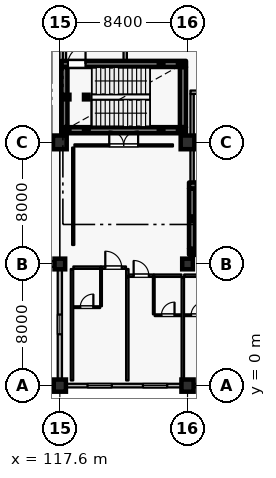
"""IFC4 building model, lengths in metres.
Left out: names, types, materials, properties, quantities, classifications, styles, units other than length and angle.
Written with IfcOpenShell. Run it as: python <this file> out.ifc"""

import sys

from ifc_helpers import new_model, si_unit, direction, frame, frame_2d, origin, origin_2d, place, context, subcontext, project, spatial, rectangle, hollow_rectangle, extrude, element, fill, save


model = new_model("IFC4")
c1 = context("Model", 3, precision=1e-05, world=origin(), true_north=direction((0.0, 1.0)))
c2 = subcontext(c1, "Body", "Model", "MODEL_VIEW")
j1 = project(units=[si_unit("LENGTHUNIT", "METRE"), si_unit("PLANEANGLEUNIT", "RADIAN")], contexts=[c1])
p1 = place(None, origin())
s1 = spatial("IfcSite", under=j1, at=p1, CompositionType="ELEMENT")
p2 = place(p1, origin())
s2 = spatial("IfcBuilding", under=s1, at=p2, CompositionType="ELEMENT")
p3 = place(p2, frame((0.0, 0.0, 11.4)))
s3 = spatial("IfcBuildingStorey", under=s2, at=p3, CompositionType="ELEMENT", Elevation=11.4)
p4 = place(p3, frame((117.6, 0.0, 0.0), z_axis=(0.0, 0.0, 1.0), x_axis=(1.0, 0.0, 0.0)))
e1 = element("IfcColumn", 1, at=p4, inside=s3, PredefinedType="COLUMN", context=c2, shape_type="SweptSolid", body=[
    extrude(rectangle(XDim=0.8, YDim=0.8, at=origin_2d()), origin(), (0.0, 0.0, 1.0), 4.8),
])
p5 = place(p3, frame((117.6, 16.0, 0.0), z_axis=(0.0, 0.0, 1.0), x_axis=(1.0, 0.0, 0.0)))
e2 = element("IfcColumn", 2, at=p5, inside=s3, PredefinedType="COLUMN", context=c2, shape_type="SweptSolid", body=[
    extrude(rectangle(XDim=0.9, YDim=0.9, at=origin_2d()), origin(), (0.0, 0.0, 1.0), 4.8),
])
p6 = place(p3, frame((126.0, 0.0, 0.0), z_axis=(0.0, 0.0, 1.0), x_axis=(1.0, 0.0, 0.0)))
e3 = element("IfcColumn", 3, at=p6, inside=s3, PredefinedType="COLUMN", context=c2, shape_type="SweptSolid", body=[
    extrude(rectangle(XDim=0.8, YDim=0.8, at=origin_2d()), origin(), (0.0, 0.0, 1.0), 4.8),
])
p7 = place(p3, frame((126.0, 16.0, 0.0), z_axis=(0.0, 0.0, 1.0), x_axis=(1.0, 0.0, 0.0)))
e4 = element("IfcColumn", 4, at=p7, inside=s3, PredefinedType="COLUMN", context=c2, shape_type="SweptSolid", body=[
    extrude(rectangle(XDim=0.9, YDim=0.9, at=origin_2d()), origin(), (0.0, 0.0, 1.0), 4.8),
])
for number, where, z_axis, x_axis in (
    (5, (117.6, 8.0, 0.0), (0.0, 0.0, 1.0), (1.0, 0.0, 0.0)),
    (6, (126.0, 8.0, 0.0), (0.0, 0.0, 1.0), (1.0, 0.0, 0.0)),
):
    element("IfcColumn", number, at=place(p3, frame(where, z_axis=z_axis, x_axis=x_axis)), inside=s3, PredefinedType="COLUMN", context=c2, shape_type="SweptSolid", body=[
        extrude(rectangle(XDim=0.7, YDim=0.7, at=origin_2d()), origin(), (0.0, 0.0, 1.0), 4.8),
    ])
p8 = place(p3, frame((117.25, 8.0, 0.0), z_axis=(0.0, 0.0, 1.0), x_axis=(-1.0, 0.0, 0.0)))
e7 = element("IfcWall", 7, at=p8, inside=s3, PredefinedType="SOLIDWALL", context=c2, shape_type="SweptSolid", body=[
    extrude(rectangle(XDim=7.7, YDim=0.38, at=frame_2d((3.85, 0.0))), origin(), (0.0, 0.0, 1.0), 3.85),
])
p9 = place(p8, frame((2.7, 0.0, 0.95)))
e8 = element("IfcOpeningElement", 8, at=p9, cuts=e7, PredefinedType="OPENING", context=c2, shape_type="SweptSolid", body=[
    extrude(rectangle(XDim=2.3, YDim=1.5, at=frame_2d((1.15, 0.75))), frame((0.0, 0.2, 0.0), z_axis=(0.0, -1.0, 0.0), x_axis=(1.0, 0.0, 0.0)), (0.0, 0.0, 1.0), 0.4),
])
p10 = place(p3, frame((125.6, 0.0, 0.0), z_axis=(0.0, 0.0, 1.0), x_axis=(-1.0, 0.0, 0.0)))
e9 = element("IfcWall", 9, at=p10, inside=s3, PredefinedType="SOLIDWALL", context=c2, shape_type="SweptSolid", body=[
    extrude(rectangle(XDim=7.6, YDim=0.24, at=frame_2d((3.8, 0.0))), origin(), (0.0, 0.0, 1.0), 4.13),
])
p11 = place(p10, frame((0.935, 0.0, 0.8)))
e10 = element("IfcOpeningElement", 10, at=p11, cuts=e9, PredefinedType="OPENING", context=c2, shape_type="SweptSolid", body=[
    extrude(rectangle(XDim=1.6, YDim=1.6, at=frame_2d((0.8, 0.8))), frame((0.0, 0.13, 0.0), z_axis=(0.0, -1.0, 0.0), x_axis=(1.0, 0.0, 0.0)), (0.0, 0.0, 1.0), 0.26),
])
p12 = place(p10, frame((4.58, 0.0, 0.8)))
e11 = element("IfcOpeningElement", 11, at=p12, cuts=e9, PredefinedType="OPENING", context=c2, shape_type="SweptSolid", body=[
    extrude(rectangle(XDim=1.6, YDim=1.6, at=frame_2d((0.8, 0.8))), frame((0.0, 0.13, 0.0), z_axis=(0.0, -1.0, 0.0), x_axis=(1.0, 0.0, 0.0)), (0.0, 0.0, 1.0), 0.26),
])
p13 = place(p3, frame((134.0, 0.0, 0.0), z_axis=(0.0, 0.0, 1.0), x_axis=(-1.0, 0.0, 0.0)))
e12 = element("IfcWall", 12, at=p13, inside=s3, PredefinedType="SOLIDWALL", context=c2, shape_type="SweptSolid", body=[
    extrude(rectangle(XDim=7.6, YDim=0.24, at=frame_2d((3.8, 0.0))), origin(), (0.0, 0.0, 1.0), 4.13),
])
p14 = place(p13, frame((2.045, 0.0, 0.8)))
e13 = element("IfcOpeningElement", 13, at=p14, cuts=e12, PredefinedType="OPENING", context=c2, shape_type="SweptSolid", body=[
    extrude(rectangle(XDim=1.6, YDim=1.6, at=frame_2d((0.8, 0.8))), frame((0.0, 0.13, 0.0), z_axis=(0.0, -1.0, 0.0), x_axis=(1.0, 0.0, 0.0)), (0.0, 0.0, 1.0), 0.26),
])
p15 = place(p13, frame((5.385, 0.0, 0.8)))
e14 = element("IfcOpeningElement", 14, at=p15, cuts=e12, PredefinedType="OPENING", context=c2, shape_type="SweptSolid", body=[
    extrude(rectangle(XDim=1.6, YDim=1.6, at=frame_2d((0.8, 0.8))), frame((0.0, 0.13, 0.0), z_axis=(0.0, -1.0, 0.0), x_axis=(1.0, 0.0, 0.0)), (0.0, 0.0, 1.0), 0.26),
])
p16 = place(p3, frame((117.6, 0.4, 0.0), z_axis=(0.0, 0.0, 1.0), x_axis=(0.0, 1.0, 0.0)))
e15 = element("IfcWall", 15, at=p16, inside=s3, PredefinedType="SOLIDWALL", context=c2, shape_type="SweptSolid", body=[
    extrude(rectangle(XDim=7.25, YDim=0.28, at=frame_2d((3.625, 0.0))), origin(), (0.0, 0.0, 1.0), 3.9),
])
p17 = place(p16, frame((2.975, 0.0, 0.75)))
e16 = element("IfcOpeningElement", 16, at=p17, cuts=e15, PredefinedType="OPENING", context=c2, shape_type="SweptSolid", body=[
    extrude(rectangle(XDim=1.3, YDim=1.65, at=frame_2d((0.65, 0.825))), frame((0.0, 0.15, 0.0), z_axis=(0.0, -1.0, 0.0), x_axis=(1.0, 0.0, 0.0)), (0.0, 0.0, 1.0), 0.3),
])
p18 = place(p3, frame((126.1, 8.8, 0.0), z_axis=(0.0, 0.0, 1.0), x_axis=(1.0, 0.0, 0.0)))
e17 = element("IfcWall", 17, at=p18, inside=s3, PredefinedType="SHEAR", context=c2, shape_type="SweptSolid", body=[
    extrude(rectangle(XDim=8.2, YDim=0.4, at=frame_2d((4.1, 0.0))), origin(), (0.0, 0.0, 1.0), 4.535),
])
p19 = place(p3, frame((126.1, 13.16, 0.0), z_axis=(0.0, 0.0, 1.0), x_axis=(1.0, 0.0, 0.0)))
e18 = element("IfcWall", 18, at=p19, inside=s3, PredefinedType="SHEAR", context=c2, shape_type="SweptSolid", body=[
    extrude(rectangle(XDim=8.2, YDim=0.4, at=frame_2d((4.1, 0.0))), origin(), (0.0, 0.0, 1.0), 4.535),
])
p20 = place(p19, frame((0.43, 0.0, 0.0)))
e19 = element("IfcOpeningElement", 19, at=p20, cuts=e18, PredefinedType="OPENING", context=c2, shape_type="SweptSolid", body=[
    extrude(rectangle(XDim=1.16, YDim=2.2, at=frame_2d((0.58, 1.1))), frame((0.0, 0.21, 0.0), z_axis=(0.0, -1.0, 0.0), x_axis=(1.0, 0.0, 0.0)), (0.0, 0.0, 1.0), 0.42),
])
p21 = place(p3, frame((126.3, 9.005, 0.0), z_axis=(0.0, 0.0, 1.0), x_axis=(0.0, 1.0, 0.0)))
e20 = element("IfcWall", 20, at=p21, inside=s3, PredefinedType="SHEAR", context=c2, shape_type="SweptSolid", body=[
    extrude(rectangle(XDim=3.95, YDim=0.4, at=frame_2d((1.975, 0.0))), origin(), (0.0, 0.0, 1.0), 4.535),
])
p22 = place(p3, frame((126.3, 13.365, 0.0), z_axis=(0.0, 0.0, 1.0), x_axis=(0.0, 1.0, 0.0)))
e21 = element("IfcWall", 21, at=p22, inside=s3, PredefinedType="PARTITIONING", context=c2, shape_type="SweptSolid", body=[
    extrude(rectangle(XDim=5.82, YDim=0.22, at=frame_2d((2.91, 0.0))), origin(), (0.0, 0.0, 1.0), 4.535),
])
p23 = place(p3, frame((126.19, 19.3, 0.0), z_axis=(0.0, 0.0, 1.0), x_axis=(1.0, 0.0, 0.0)))
e22 = element("IfcWall", 22, at=p23, inside=s3, PredefinedType="PARTITIONING", context=c2, shape_type="SweptSolid", body=[
    extrude(rectangle(XDim=3.82, YDim=0.22, at=frame_2d((1.91, 0.0))), origin(), (0.0, 0.0, 1.0), 4.535),
])
p24 = place(p23, frame((1.35, 0.0, 0.0)))
e23 = element("IfcOpeningElement", 23, at=p24, cuts=e22, PredefinedType="OPENING", context=c2, shape_type="SweptSolid", body=[
    extrude(rectangle(XDim=1.12, YDim=2.2, at=frame_2d((0.56, 1.1))), frame((0.0, 0.12, 0.0), z_axis=(0.0, -1.0, 0.0), x_axis=(1.0, 0.0, 0.0)), (0.0, 0.0, 1.0), 0.24),
])
for number, where, z_axis, x_axis in (
    (24, (126.48, 8.8, 0.0), (0.0, 0.0, 1.0), (1.0, 0.0, 0.0)),
    (25, (126.48, 10.98, 0.0), (0.0, 0.0, 1.0), (1.0, 0.0, 0.0)),
):
    element("IfcColumn", number, at=place(p3, frame(where, z_axis=z_axis, x_axis=x_axis)), inside=s3, PredefinedType="COLUMN", context=c2, shape_type="SweptSolid", body=[
        extrude(hollow_rectangle(XDim=0.3, YDim=0.3, WallThickness=0.012, at=origin_2d()), origin(), (0.0, 0.0, 1.0), 4.62),
    ])
p25 = place(p3, frame((117.7, 16.8, 0.0), z_axis=(0.0, 0.0, 1.0), x_axis=(1.0, 0.0, 0.0)))
e26 = element("IfcWall", 26, at=p25, inside=s3, PredefinedType="SHEAR", context=c2, shape_type="SweptSolid", body=[
    extrude(rectangle(XDim=8.2, YDim=0.4, at=frame_2d((4.1, 0.0))), origin(), (0.0, 0.0, 1.0), 4.535),
])
p26 = place(p3, frame((125.7, 17.005, 0.0), z_axis=(0.0, 0.0, 1.0), x_axis=(0.0, 1.0, 0.0)))
e27 = element("IfcWall", 27, at=p26, inside=s3, PredefinedType="SHEAR", context=c2, shape_type="SweptSolid", body=[
    extrude(rectangle(XDim=3.95, YDim=0.4, at=frame_2d((1.975, 0.0))), origin(), (0.0, 0.0, 1.0), 4.535),
])
p27 = place(p3, frame((117.7, 21.16, 0.0), z_axis=(0.0, 0.0, 1.0), x_axis=(1.0, 0.0, 0.0)))
e28 = element("IfcWall", 28, at=p27, inside=s3, PredefinedType="SHEAR", context=c2, shape_type="SweptSolid", body=[
    extrude(rectangle(XDim=8.2, YDim=0.4, at=frame_2d((4.1, 0.0))), origin(), (0.0, 0.0, 1.0), 4.535),
])
p28 = place(p27, frame((0.43, 0.0, 0.0)))
e29 = element("IfcOpeningElement", 29, at=p28, cuts=e28, PredefinedType="OPENING", context=c2, shape_type="SweptSolid", body=[
    extrude(rectangle(XDim=1.16, YDim=2.2, at=frame_2d((0.58, 1.1))), frame((0.0, 0.21, 0.0), z_axis=(0.0, -1.0, 0.0), x_axis=(1.0, 0.0, 0.0)), (0.0, 0.0, 1.0), 0.42),
])
p29 = place(p3, frame((117.9, 17.005, 0.0), z_axis=(0.0, 0.0, 1.0), x_axis=(0.0, 1.0, 0.0)))
e30 = element("IfcWall", 30, at=p29, inside=s3, PredefinedType="SHEAR", context=c2, shape_type="SweptSolid", body=[
    extrude(rectangle(XDim=3.95, YDim=0.4, at=frame_2d((1.975, 0.0))), origin(), (0.0, 0.0, 1.0), 4.535),
])
for number, where, z_axis, x_axis in (
    (31, (117.9, 21.365, 0.0), (0.0, 0.0, 1.0), (0.0, 1.0, 0.0)),
    (32, (121.9, 21.365, 0.0), (0.0, 0.0, 1.0), (0.0, 1.0, 0.0)),
):
    element("IfcWall", number, at=place(p3, frame(where, z_axis=z_axis, x_axis=x_axis)), inside=s3, PredefinedType="PARTITIONING", context=c2, shape_type="SweptSolid", body=[
        extrude(rectangle(XDim=1.87, YDim=0.22, at=frame_2d((0.935, 0.0))), origin(), (0.0, 0.0, 1.0), 4.535),
    ])
for number, where, z_axis, x_axis in (
    (33, (118.08, 16.8, 0.0), (0.0, 0.0, 1.0), (1.0, 0.0, 0.0)),
    (34, (118.08, 18.98, 0.0), (0.0, 0.0, 1.0), (1.0, 0.0, 0.0)),
    (35, (119.34, 16.8, 0.0), (0.0, 0.0, 1.0), (1.0, 0.0, 0.0)),
    (36, (119.34, 18.98, 0.0), (0.0, 0.0, 1.0), (1.0, 0.0, 0.0)),
):
    element("IfcColumn", number, at=place(p3, frame(where, z_axis=z_axis, x_axis=x_axis)), inside=s3, PredefinedType="COLUMN", context=c2, shape_type="SweptSolid", body=[
        extrude(hollow_rectangle(XDim=0.3, YDim=0.3, WallThickness=0.012, at=origin_2d()), origin(), (0.0, 0.0, 1.0), 4.62),
    ])
for number, where, z_axis, x_axis in (
    (37, (124.26, 16.8, -2.7), (0.0, 0.0, 1.0), (1.0, 0.0, 0.0)),
    (38, (124.26, 21.16, -2.7), (0.0, 0.0, 1.0), (1.0, 0.0, 0.0)),
    (39, (125.52, 16.8, -2.7), (0.0, 0.0, 1.0), (1.0, 0.0, 0.0)),
    (40, (125.52, 21.16, -2.7), (0.0, 0.0, 1.0), (1.0, 0.0, 0.0)),
):
    element("IfcColumn", number, at=place(p3, frame(where, z_axis=z_axis, x_axis=x_axis)), inside=s3, PredefinedType="COLUMN", context=c2, shape_type="SweptSolid", body=[
        extrude(hollow_rectangle(XDim=0.3, YDim=0.3, WallThickness=0.012, at=origin_2d()), origin(), (0.0, 0.0, 1.0), 4.92),
    ])
p30 = place(p3, frame((118.49, 7.76, 0.0), z_axis=(0.0, 0.0, 1.0), x_axis=(1.0, 0.0, 0.0)))
e41 = element("IfcWall", 41, at=p30, inside=s3, PredefinedType="PARTITIONING", context=c2, shape_type="SweptSolid", body=[
    extrude(rectangle(XDim=1.81, YDim=0.16, at=frame_2d((0.905, 0.0))), origin(), (0.0, 0.0, 1.0), 4.535),
])
p31 = place(p3, frame((120.31, 7.76, 0.0), z_axis=(0.0, 0.0, 1.0), x_axis=(1.0, 0.0, 0.0)))
e42 = element("IfcWall", 42, at=p31, inside=s3, PredefinedType="PARTITIONING", context=c2, shape_type="SweptSolid", body=[
    extrude(rectangle(XDim=1.64, YDim=0.16, at=frame_2d((0.82, 0.0))), origin(), (0.0, 0.0, 1.0), 4.535),
])
p32 = place(p31, frame((0.28, 0.0, 0.0)))
e43 = element("IfcOpeningElement", 43, at=p32, cuts=e42, PredefinedType="OPENING", context=c2, shape_type="SweptSolid", body=[
    extrude(rectangle(XDim=1.08, YDim=2.3, at=frame_2d((0.54, 1.15))), frame((0.0, 0.09, 0.0), z_axis=(0.0, -1.0, 0.0), x_axis=(1.0, 0.0, 0.0)), (0.0, 0.0, 1.0), 0.18),
])
p33 = place(p3, frame((120.31, 5.22, 0.0), z_axis=(0.0, 0.0, 1.0), x_axis=(0.0, 1.0, 0.0)))
e44 = element("IfcWall", 44, at=p33, inside=s3, PredefinedType="PARTITIONING", context=c2, shape_type="SweptSolid", body=[
    extrude(rectangle(XDim=2.45, YDim=0.115, at=frame_2d((1.225, 0.0))), origin(), (0.0, 0.0, 1.0), 4.535),
])
p34 = place(p3, frame((118.5, 5.16, 0.0), z_axis=(0.0, 0.0, 1.0), x_axis=(1.0, 0.0, 0.0)))
e45 = element("IfcWall", 45, at=p34, inside=s3, PredefinedType="PARTITIONING", context=c2, shape_type="SweptSolid", body=[
    extrude(rectangle(XDim=1.75, YDim=0.115, at=frame_2d((0.875, 0.0))), origin(), (0.0, 0.0, 1.0), 4.535),
])
p35 = place(p34, frame((0.445, 0.0, 0.0)))
e46 = element("IfcOpeningElement", 46, at=p35, cuts=e45, PredefinedType="OPENING", context=c2, shape_type="SweptSolid", body=[
    extrude(rectangle(XDim=0.86, YDim=2.12, at=frame_2d((0.43, 1.06))), frame((0.0, 0.067, 0.0), z_axis=(0.0, -1.0, 0.0), x_axis=(1.0, 0.0, 0.0)), (0.0, 0.0, 1.0), 0.135),
])
p36 = place(p3, frame((118.4, 0.34, 0.0), z_axis=(0.0, 0.0, 1.0), x_axis=(0.0, 1.0, 0.0)))
e47 = element("IfcWall", 47, at=p36, inside=s3, PredefinedType="PARTITIONING", context=c2, shape_type="SweptSolid", body=[
    extrude(rectangle(XDim=7.33, YDim=0.16, at=frame_2d((3.665, 0.0))), origin(), (0.0, 0.0, 1.0), 4.535),
])
p37 = place(p3, frame((122.04, 7.15, 0.0), z_axis=(0.0, 0.0, 1.0), x_axis=(0.0, 1.0, 0.0)))
e48 = element("IfcWall", 48, at=p37, inside=s3, PredefinedType="PARTITIONING", context=c2, shape_type="SweptSolid", body=[
    extrude(rectangle(XDim=0.52, YDim=0.16, at=frame_2d((0.26, 0.0))), origin(), (0.0, 0.0, 1.0), 4.535),
])
p38 = place(p3, frame((122.13, 7.23, 0.0), z_axis=(0.0, 0.0, 1.0), x_axis=(1.0, 0.0, 0.0)))
e49 = element("IfcWall", 49, at=p38, inside=s3, PredefinedType="PARTITIONING", context=c2, shape_type="SweptSolid", body=[
    extrude(rectangle(XDim=1.65, YDim=0.16, at=frame_2d((0.825, 0.0))), origin(), (0.0, 0.0, 1.0), 4.535),
])
p39 = place(p38, frame((0.325, 0.0, 0.0)))
e50 = element("IfcOpeningElement", 50, at=p39, cuts=e49, PredefinedType="OPENING", context=c2, shape_type="SweptSolid", body=[
    extrude(rectangle(XDim=1.0, YDim=2.25, at=frame_2d((0.5, 1.125))), frame((0.0, 0.09, 0.0), z_axis=(0.0, -1.0, 0.0), x_axis=(1.0, 0.0, 0.0)), (0.0, 0.0, 1.0), 0.18),
])
p40 = place(p3, frame((123.79, 7.23, 0.0), z_axis=(0.0, 0.0, 1.0), x_axis=(1.0, 0.0, 0.0)))
e51 = element("IfcWall", 51, at=p40, inside=s3, PredefinedType="PARTITIONING", context=c2, shape_type="SweptSolid", body=[
    extrude(rectangle(XDim=1.81, YDim=0.16, at=frame_2d((0.905, 0.0))), origin(), (0.0, 0.0, 1.0), 4.535),
])
p41 = place(p3, frame((123.78, 4.69, 0.0), z_axis=(0.0, 0.0, 1.0), x_axis=(0.0, 1.0, 0.0)))
e52 = element("IfcWall", 52, at=p41, inside=s3, PredefinedType="PARTITIONING", context=c2, shape_type="SweptSolid", body=[
    extrude(rectangle(XDim=2.45, YDim=0.115, at=frame_2d((1.225, 0.0))), origin(), (0.0, 0.0, 1.0), 4.535),
])
p42 = place(p3, frame((123.84, 4.63, 0.0), z_axis=(0.0, 0.0, 1.0), x_axis=(1.0, 0.0, 0.0)))
e53 = element("IfcWall", 53, at=p42, inside=s3, PredefinedType="PARTITIONING", context=c2, shape_type="SweptSolid", body=[
    extrude(rectangle(XDim=1.75, YDim=0.115, at=frame_2d((0.875, 0.0))), origin(), (0.0, 0.0, 1.0), 4.535),
])
p43 = place(p42, frame((0.445, 0.0, 0.0)))
e54 = element("IfcOpeningElement", 54, at=p43, cuts=e53, PredefinedType="OPENING", context=c2, shape_type="SweptSolid", body=[
    extrude(rectangle(XDim=0.86, YDim=2.12, at=frame_2d((0.43, 1.06))), frame((0.0, 0.067, 0.0), z_axis=(0.0, -1.0, 0.0), x_axis=(1.0, 0.0, 0.0)), (0.0, 0.0, 1.0), 0.135),
])
p44 = place(p3, frame((122.04, 0.34, 0.0), z_axis=(0.0, 0.0, 1.0), x_axis=(0.0, 1.0, 0.0)))
e55 = element("IfcWall", 55, at=p44, inside=s3, PredefinedType="PARTITIONING", context=c2, shape_type="SweptSolid", body=[
    extrude(rectangle(XDim=6.8, YDim=0.16, at=frame_2d((3.4, 0.0))), origin(), (0.0, 0.0, 1.0), 4.535),
])
p45 = place(p3, frame((125.78, 7.23, 0.0), z_axis=(0.0, 0.0, 1.0), x_axis=(1.0, 0.0, 0.0)))
e56 = element("IfcWall", 56, at=p45, inside=s3, PredefinedType="PARTITIONING", context=c2, shape_type="SweptSolid", body=[
    extrude(rectangle(XDim=1.81, YDim=0.16, at=frame_2d((0.905, 0.0))), origin(), (0.0, 0.0, 1.0), 4.535),
])
p46 = place(p3, frame((125.79, 4.63, 0.0), z_axis=(0.0, 0.0, 1.0), x_axis=(1.0, 0.0, 0.0)))
e57 = element("IfcWall", 57, at=p46, inside=s3, PredefinedType="PARTITIONING", context=c2, shape_type="SweptSolid", body=[
    extrude(rectangle(XDim=1.75, YDim=0.115, at=frame_2d((0.875, 0.0))), origin(), (0.0, 0.0, 1.0), 4.535),
])
p47 = place(p46, frame((0.445, 0.0, 0.0)))
e58 = element("IfcOpeningElement", 58, at=p47, cuts=e57, PredefinedType="OPENING", context=c2, shape_type="SweptSolid", body=[
    extrude(rectangle(XDim=0.86, YDim=2.12, at=frame_2d((0.43, 1.06))), frame((0.0, 0.067, 0.0), z_axis=(0.0, -1.0, 0.0), x_axis=(1.0, 0.0, 0.0)), (0.0, 0.0, 1.0), 0.135),
])
p48 = place(p3, frame((125.69, 0.34, 0.0), z_axis=(0.0, 0.0, 1.0), x_axis=(0.0, 1.0, 0.0)))
e59 = element("IfcWall", 59, at=p48, inside=s3, PredefinedType="PARTITIONING", context=c2, shape_type="SweptSolid", body=[
    extrude(rectangle(XDim=6.8, YDim=0.16, at=frame_2d((3.4, 0.0))), origin(), (0.0, 0.0, 1.0), 4.535),
])
p49 = place(p3, frame((118.56, 15.8, 0.0), z_axis=(0.0, 0.0, 1.0), x_axis=(1.0, 0.0, 0.0)))
e60 = element("IfcWall", 60, at=p49, inside=s3, PredefinedType="PARTITIONING", context=c2, shape_type="SweptSolid", body=[
    extrude(rectangle(XDim=6.48, YDim=0.14, at=frame_2d((3.24, 0.0))), origin(), (0.0, 0.0, 1.0), 4.535),
])
p50 = place(p49, frame((2.29, 0.0, 0.0)))
e61 = element("IfcOpeningElement", 61, at=p50, cuts=e60, PredefinedType="OPENING", context=c2, shape_type="SweptSolid", body=[
    extrude(rectangle(XDim=1.9, YDim=2.4, at=frame_2d((0.95, 1.2))), frame((0.0, 0.08, 0.0), z_axis=(0.0, -1.0, 0.0), x_axis=(1.0, 0.0, 0.0)), (0.0, 0.0, 1.0), 0.16),
])
p51 = place(p3, frame((118.48, 9.25, 0.0), z_axis=(0.0, 0.0, 1.0), x_axis=(0.0, 1.0, 0.0)))
e62 = element("IfcWall", 62, at=p51, inside=s3, PredefinedType="PARTITIONING", context=c2, shape_type="SweptSolid", body=[
    extrude(rectangle(XDim=6.41, YDim=0.14, at=frame_2d((3.205, 0.0))), origin(), (0.0, 0.0, 1.0), 4.535),
])
p52 = place(p11, origin())
e63 = element("IfcWindow", 63, at=p52, inside=s3, PartitioningType="SINGLE_PANEL", PredefinedType="WINDOW", context=c2, shape_type="SweptSolid", body=[
    extrude(rectangle(XDim=1.6, YDim=1.6, at=frame_2d((0.8, 0.8))), frame((0.0, 0.03, 0.0), z_axis=(0.0, -1.0, 0.0), x_axis=(1.0, 0.0, 0.0)), (0.0, 0.0, 1.0), 0.06),
])
fill(e10, e63)
p53 = place(p12, origin())
e64 = element("IfcWindow", 64, at=p53, inside=s3, PartitioningType="SINGLE_PANEL", PredefinedType="WINDOW", context=c2, shape_type="SweptSolid", body=[
    extrude(rectangle(XDim=1.6, YDim=1.6, at=frame_2d((0.8, 0.8))), frame((0.0, 0.03, 0.0), z_axis=(0.0, -1.0, 0.0), x_axis=(1.0, 0.0, 0.0)), (0.0, 0.0, 1.0), 0.06),
])
fill(e11, e64)
p54 = place(p17, origin())
e65 = element("IfcWindow", 65, at=p54, inside=s3, PartitioningType="SINGLE_PANEL", PredefinedType="WINDOW", context=c2, shape_type="SweptSolid", body=[
    extrude(rectangle(XDim=1.3, YDim=1.65, at=frame_2d((0.65, 0.825))), frame((0.0, 0.03, 0.0), z_axis=(0.0, -1.0, 0.0), x_axis=(1.0, 0.0, 0.0)), (0.0, 0.0, 1.0), 0.06),
])
fill(e16, e65)
p55 = place(p20, origin())
e66 = element("IfcDoor", 66, at=p55, inside=s3, OperationType="SINGLE_SWING_RIGHT", PredefinedType="DOOR", context=c2, shape_type="SweptSolid", body=[
    extrude(rectangle(XDim=1.16, YDim=2.2, at=frame_2d((0.58, 1.1))), frame((0.0, 0.025, 0.0), z_axis=(0.0, -1.0, 0.0), x_axis=(1.0, 0.0, 0.0)), (0.0, 0.0, 1.0), 0.05),
])
fill(e19, e66)
p56 = place(p28, origin())
e67 = element("IfcDoor", 67, at=p56, inside=s3, OperationType="SINGLE_SWING_RIGHT", PredefinedType="DOOR", context=c2, shape_type="SweptSolid", body=[
    extrude(rectangle(XDim=1.16, YDim=2.2, at=frame_2d((0.58, 1.1))), frame((0.0, 0.025, 0.0), z_axis=(0.0, -1.0, 0.0), x_axis=(1.0, 0.0, 0.0)), (0.0, 0.0, 1.0), 0.05),
])
fill(e29, e67)
p57 = place(p32, origin())
e68 = element("IfcDoor", 68, at=p57, inside=s3, OperationType="SINGLE_SWING_LEFT", PredefinedType="DOOR", context=c2, shape_type="SweptSolid", body=[
    extrude(rectangle(XDim=1.08, YDim=2.3, at=frame_2d((0.54, 1.15))), frame((0.0, 0.025, 0.0), z_axis=(0.0, -1.0, 0.0), x_axis=(1.0, 0.0, 0.0)), (0.0, 0.0, 1.0), 0.05),
])
fill(e43, e68)
p58 = place(p35, origin())
e69 = element("IfcDoor", 69, at=p58, inside=s3, OperationType="SINGLE_SWING_RIGHT", PredefinedType="DOOR", context=c2, shape_type="SweptSolid", body=[
    extrude(rectangle(XDim=0.86, YDim=2.12, at=frame_2d((0.43, 1.06))), frame((0.0, 0.025, 0.0), z_axis=(0.0, -1.0, 0.0), x_axis=(1.0, 0.0, 0.0)), (0.0, 0.0, 1.0), 0.05),
])
fill(e46, e69)
p59 = place(p39, origin())
e70 = element("IfcDoor", 70, at=p59, inside=s3, OperationType="SINGLE_SWING_LEFT", PredefinedType="DOOR", context=c2, shape_type="SweptSolid", body=[
    extrude(rectangle(XDim=1.0, YDim=2.25, at=frame_2d((0.5, 1.125))), frame((0.0, 0.025, 0.0), z_axis=(0.0, -1.0, 0.0), x_axis=(1.0, 0.0, 0.0)), (0.0, 0.0, 1.0), 0.05),
])
fill(e50, e70)
p60 = place(p43, origin())
e71 = element("IfcDoor", 71, at=p60, inside=s3, OperationType="SINGLE_SWING_RIGHT", PredefinedType="DOOR", context=c2, shape_type="SweptSolid", body=[
    extrude(rectangle(XDim=0.86, YDim=2.12, at=frame_2d((0.43, 1.06))), frame((0.0, 0.025, 0.0), z_axis=(0.0, -1.0, 0.0), x_axis=(1.0, 0.0, 0.0)), (0.0, 0.0, 1.0), 0.05),
])
fill(e54, e71)
p61 = place(p47, origin())
e72 = element("IfcDoor", 72, at=p61, inside=s3, OperationType="SINGLE_SWING_RIGHT", PredefinedType="DOOR", context=c2, shape_type="SweptSolid", body=[
    extrude(rectangle(XDim=0.86, YDim=2.12, at=frame_2d((0.43, 1.06))), frame((0.0, 0.025, 0.0), z_axis=(0.0, -1.0, 0.0), x_axis=(1.0, 0.0, 0.0)), (0.0, 0.0, 1.0), 0.05),
])
fill(e58, e72)
p62 = place(p50, origin())
e73 = element("IfcDoor", 73, at=p62, inside=s3, OperationType="DOUBLE_DOOR_SINGLE_SWING", PredefinedType="DOOR", context=c2, shape_type="SweptSolid", body=[
    extrude(rectangle(XDim=1.9, YDim=2.4, at=frame_2d((0.95, 1.2))), frame((0.0, 0.025, 0.0), z_axis=(0.0, -1.0, 0.0), x_axis=(1.0, 0.0, 0.0)), (0.0, 0.0, 1.0), 0.05),
])
fill(e61, e73)
save(model, sys.argv[1])
